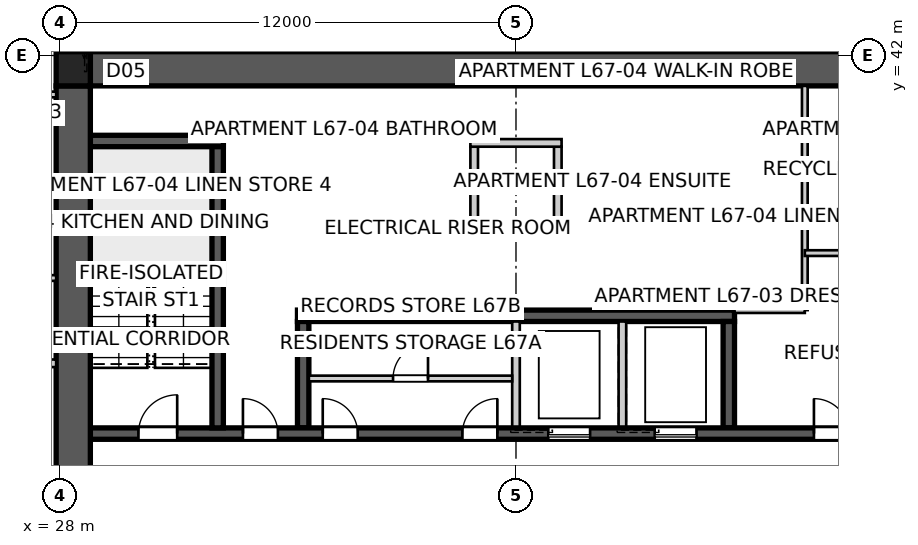
"""IFC4 building model, lengths in metres.
Left out: names, types, materials, properties, quantities, classifications, styles, units other than length and angle.
Written with IfcOpenShell. Run it as: python <this file> out.ifc"""

import sys

from ifc_helpers import new_model, si_unit, direction, frame, frame_2d, origin, origin_2d, place, context, subcontext, project, spatial, polyline, rectangle, outline, extrude, element, fill, save


model = new_model("IFC4")
c1 = context("Model", 3, precision=1e-05, world=origin(), true_north=direction((0.0, 1.0)))
c2 = subcontext(c1, "Body", "Model", "MODEL_VIEW")
j1 = project(units=[si_unit("LENGTHUNIT", "METRE"), si_unit("PLANEANGLEUNIT", "RADIAN")], contexts=[c1])
p1 = place(None, origin())
s1 = spatial("IfcSite", under=j1, at=p1, CompositionType="ELEMENT")
p2 = place(p1, origin())
s2 = spatial("IfcBuilding", under=s1, at=p2, CompositionType="ELEMENT")
p3 = place(p2, frame((0.0, 0.0, 243.8)))
s3 = spatial("IfcBuildingStorey", under=s2, at=p3, CompositionType="ELEMENT", Elevation=243.8)
p4 = place(p3, frame((28.8, 41.65, 0.0), z_axis=(0.0, 0.0, 1.0), x_axis=(1.0, 0.0, 0.0)))
e1 = element("IfcWall", 1, at=p4, inside=s3, PredefinedType="SHEAR", context=c2, shape_type="SweptSolid", body=[
    extrude(outline(polyline([(0.0, -0.45), (22.4, -0.45), (22.4, -0.025), (22.85, -0.025), (22.85, 0.025), (22.4, 0.025), (22.4, 0.45), (0.0, 0.45), (0.0, 0.025), (-0.45, 0.025), (-0.45, -0.025), (0.0, -0.025), (0.0, -0.45)])), origin(), (0.0, 0.0, 1.0), 3.4),
])
p5 = place(p3, frame((28.35, 41.2, 0.0), z_axis=(0.0, 0.0, 1.0), x_axis=(0.0, -1.0, 0.0)))
e2 = element("IfcWall", 2, at=p5, inside=s3, PredefinedType="SHEAR", context=c2, shape_type="SweptSolid", body=[
    extrude(outline(polyline([(0.0, -0.45), (22.4, -0.45), (22.4, -0.025), (22.85, -0.025), (22.85, 0.025), (22.4, 0.025), (22.4, 0.45), (0.0, 0.45), (0.0, 0.025), (-0.45, 0.025), (-0.45, -0.025), (0.0, -0.025), (0.0, -0.45)])), origin(), (0.0, 0.0, 1.0), 3.4),
])
p6 = place(p5, frame((11.14, 0.0, 0.0)))
e3 = element("IfcOpeningElement", 3, at=p6, cuts=e2, PredefinedType="OPENING", context=c2, shape_type="SweptSolid", body=[
    extrude(rectangle(XDim=1.02, YDim=2.4, at=frame_2d((0.51, 1.2))), frame((0.0, 0.46, 0.0), z_axis=(0.0, -1.0, 0.0), x_axis=(1.0, 0.0, 0.0)), (0.0, 0.0, 1.0), 0.92),
])
p7 = place(p3, frame((28.8, 32.05, 0.0), z_axis=(0.0, 0.0, 1.0), x_axis=(1.0, 0.0, 0.0)))
e4 = element("IfcWall", 4, at=p7, inside=s3, PredefinedType="SHEAR", context=c2, shape_type="SweptSolid", body=[
    extrude(rectangle(XDim=22.4, YDim=0.3, at=frame_2d((11.2, 0.0))), origin(), (0.0, 0.0, 1.0), 3.4),
])
p8 = place(p7, frame((19.04, 0.0, 0.0)))
e5 = element("IfcOpeningElement", 5, at=p8, cuts=e4, PredefinedType="OPENING", context=c2, shape_type="SweptSolid", body=[
    extrude(rectangle(XDim=0.92, YDim=2.1, at=frame_2d((0.46, 1.05))), frame((0.0, 0.16, 0.0), z_axis=(0.0, -1.0, 0.0), x_axis=(1.0, 0.0, 0.0)), (0.0, 0.0, 1.0), 0.32),
])
p9 = place(p7, frame((1.265, 0.0, 0.0)))
e6 = element("IfcOpeningElement", 6, at=p9, cuts=e4, PredefinedType="OPENING", context=c2, shape_type="SweptSolid", body=[
    extrude(rectangle(XDim=1.02, YDim=2.1, at=frame_2d((0.51, 1.05))), frame((0.0, 0.16, 0.0), z_axis=(0.0, -1.0, 0.0), x_axis=(1.0, 0.0, 0.0)), (0.0, 0.0, 1.0), 0.32),
])
p10 = place(p7, frame((4.015, 0.0, 0.0)))
e7 = element("IfcOpeningElement", 7, at=p10, cuts=e4, PredefinedType="OPENING", context=c2, shape_type="SweptSolid", body=[
    extrude(rectangle(XDim=0.92, YDim=2.1, at=frame_2d((0.46, 1.05))), frame((0.0, 0.16, 0.0), z_axis=(0.0, -1.0, 0.0), x_axis=(1.0, 0.0, 0.0)), (0.0, 0.0, 1.0), 0.32),
])
p11 = place(p7, frame((6.115, 0.0, 0.0)))
e8 = element("IfcOpeningElement", 8, at=p11, cuts=e4, PredefinedType="OPENING", context=c2, shape_type="SweptSolid", body=[
    extrude(rectangle(XDim=0.92, YDim=2.1, at=frame_2d((0.46, 1.05))), frame((0.0, 0.16, 0.0), z_axis=(0.0, -1.0, 0.0), x_axis=(1.0, 0.0, 0.0)), (0.0, 0.0, 1.0), 0.32),
])
p12 = place(p7, frame((9.79, 0.0, 0.0)))
e9 = element("IfcOpeningElement", 9, at=p12, cuts=e4, PredefinedType="OPENING", context=c2, shape_type="SweptSolid", body=[
    extrude(rectangle(XDim=0.92, YDim=2.1, at=frame_2d((0.46, 1.05))), frame((0.0, 0.16, 0.0), z_axis=(0.0, -1.0, 0.0), x_axis=(1.0, 0.0, 0.0)), (0.0, 0.0, 1.0), 0.32),
])
p13 = place(p7, frame((12.05, 0.0, 0.0)))
e10 = element("IfcOpeningElement", 10, at=p13, cuts=e4, PredefinedType="OPENING", context=c2, shape_type="SweptSolid", body=[
    extrude(rectangle(XDim=1.1, YDim=2.1, at=frame_2d((0.55, 1.05))), frame((0.0, 0.16, 0.0), z_axis=(0.0, -1.0, 0.0), x_axis=(1.0, 0.0, 0.0)), (0.0, 0.0, 1.0), 0.32),
])
p14 = place(p7, frame((14.85, 0.0, 0.0)))
e11 = element("IfcOpeningElement", 11, at=p14, cuts=e4, PredefinedType="OPENING", context=c2, shape_type="SweptSolid", body=[
    extrude(rectangle(XDim=1.1, YDim=2.1, at=frame_2d((0.55, 1.05))), frame((0.0, 0.16, 0.0), z_axis=(0.0, -1.0, 0.0), x_axis=(1.0, 0.0, 0.0)), (0.0, 0.0, 1.0), 0.32),
])
p15 = place(p3, frame((34.25, 35.15, 0.0), z_axis=(0.0, 0.0, 1.0), x_axis=(1.0, 0.0, 0.0)))
e12 = element("IfcWall", 12, at=p15, inside=s3, PredefinedType="SHEAR", context=c2, shape_type="SweptSolid", body=[
    extrude(rectangle(XDim=11.5, YDim=0.3, at=frame_2d((5.75, 0.0))), origin(), (0.0, 0.0, 1.0), 3.4),
])
p16 = place(p3, frame((34.4, 32.2, 0.0), z_axis=(0.0, 0.0, 1.0), x_axis=(0.0, 1.0, 0.0)))
e13 = element("IfcWall", 13, at=p16, inside=s3, PredefinedType="SHEAR", context=c2, shape_type="SweptSolid", body=[
    extrude(rectangle(XDim=2.8, YDim=0.3, at=frame_2d((1.4, 0.0))), origin(), (0.0, 0.0, 1.0), 3.4),
])
for number, where, z_axis, x_axis in (
    (14, (40.0, 32.2, 0.0), (0.0, 0.0, 1.0), (0.0, 1.0, 0.0)),
    (15, (42.8, 32.2, 0.0), (0.0, 0.0, 1.0), (0.0, 1.0, 0.0)),
):
    element("IfcWall", number, at=place(p3, frame(where, z_axis=z_axis, x_axis=x_axis)), inside=s3, PredefinedType="SOLIDWALL", context=c2, shape_type="SweptSolid", body=[
        extrude(rectangle(XDim=2.8, YDim=0.2, at=frame_2d((1.4, 0.0))), origin(), (0.0, 0.0, 1.0), 3.4),
    ])
p17 = place(p3, frame((45.6, 32.2, 0.0), z_axis=(0.0, 0.0, 1.0), x_axis=(0.0, 1.0, 0.0)))
e16 = element("IfcWall", 16, at=p17, inside=s3, PredefinedType="SHEAR", context=c2, shape_type="SweptSolid", body=[
    extrude(rectangle(XDim=2.8, YDim=0.3, at=frame_2d((1.4, 0.0))), origin(), (0.0, 0.0, 1.0), 3.4),
])
p18 = place(p3, frame((32.15, 32.2, 0.0), z_axis=(0.0, 0.0, 1.0), x_axis=(0.0, 1.0, 0.0)))
e17 = element("IfcWall", 17, at=p18, inside=s3, PredefinedType="SHEAR", context=c2, shape_type="SweptSolid", body=[
    extrude(rectangle(XDim=7.7, YDim=0.3, at=frame_2d((3.85, 0.0))), origin(), (0.0, 0.0, 1.0), 3.4),
])
p19 = place(p3, frame((28.8, 39.75, 0.0), z_axis=(0.0, 0.0, 1.0), x_axis=(1.0, 0.0, 0.0)))
e18 = element("IfcWall", 18, at=p19, inside=s3, PredefinedType="SHEAR", context=c2, shape_type="SweptSolid", body=[
    extrude(rectangle(XDim=3.5, YDim=0.3, at=frame_2d((1.75, 0.0))), origin(), (0.0, 0.0, 1.0), 3.4),
])
for number, where, z_axis, x_axis in (
    (19, (38.9, 37.6, 0.0), (0.0, 0.0, 1.0), (0.0, 1.0, 0.0)),
    (20, (41.1, 37.6, 0.0), (0.0, 0.0, 1.0), (0.0, 1.0, 0.0)),
):
    element("IfcWall", number, at=place(p3, frame(where, z_axis=z_axis, x_axis=x_axis)), inside=s3, PredefinedType="SOLIDWALL", context=c2, shape_type="SweptSolid", body=[
        extrude(rectangle(XDim=2.0, YDim=0.2, at=frame_2d((1.0, 0.0))), origin(), (0.0, 0.0, 1.0), 3.4),
    ])
for number, where, z_axis, x_axis in (
    (21, (38.8, 37.5, 0.0), (0.0, 0.0, 1.0), (1.0, 0.0, 0.0)),
    (22, (38.8, 39.7, 0.0), (0.0, 0.0, 1.0), (1.0, 0.0, 0.0)),
):
    element("IfcWall", number, at=place(p3, frame(where, z_axis=z_axis, x_axis=x_axis)), inside=s3, PredefinedType="SOLIDWALL", context=c2, shape_type="SweptSolid", body=[
        extrude(rectangle(XDim=2.4, YDim=0.2, at=frame_2d((1.2, 0.0))), origin(), (0.0, 0.0, 1.0), 3.4),
    ])
p20 = place(p3, frame((28.35, 41.65, 0.0), z_axis=(0.0, 0.0, 1.0), x_axis=(1.0, 0.0, 0.0)))
e23 = element("IfcColumn", 23, at=p20, inside=s3, PredefinedType="COLUMN", context=c2, shape_type="SweptSolid", body=[
    extrude(rectangle(XDim=0.9, YDim=0.9, at=origin_2d()), origin(), (0.0, 0.0, 1.0), 3.4),
])
p21 = place(p3, frame((27.9, 33.9, 0.0), z_axis=(0.0, 0.0, 1.0), x_axis=(-1.0, 0.0, 0.0)))
e24 = element("IfcWall", 24, at=p21, inside=s3, PredefinedType="PARTITIONING", context=c2, shape_type="SweptSolid", body=[
    extrude(rectangle(XDim=2.5, YDim=0.2, at=frame_2d((1.25, 0.0))), origin(), (0.0, 0.0, 1.0), 3.25),
])
p22 = place(p3, frame((47.6, 41.2, 0.0), z_axis=(0.0, 0.0, 1.0), x_axis=(0.0, -1.0, 0.0)))
e25 = element("IfcWall", 25, at=p22, inside=s3, PredefinedType="SOLIDWALL", context=c2, shape_type="SweptSolid", body=[
    extrude(rectangle(XDim=5.9, YDim=0.15, at=frame_2d((2.95, 0.0))), origin(), (0.0, 0.0, 1.0), 3.25),
])
p23 = place(p3, frame((47.6, 35.3, 0.0), z_axis=(0.0, 0.0, 1.0), x_axis=(-1.0, 0.0, 0.0)))
e26 = element("IfcWall", 26, at=p23, inside=s3, PredefinedType="SOLIDWALL", context=c2, shape_type="SweptSolid", body=[
    extrude(rectangle(XDim=1.85, YDim=0.15, at=frame_2d((0.925, 0.0))), origin(), (0.0, 0.0, 1.0), 3.25),
])
p24 = place(p3, frame((47.6, 36.8, 0.0), z_axis=(0.0, 0.0, 1.0), x_axis=(1.0, 0.0, 0.0)))
e27 = element("IfcWall", 27, at=p24, inside=s3, PredefinedType="SOLIDWALL", context=c2, shape_type="SweptSolid", body=[
    extrude(rectangle(XDim=3.6, YDim=0.15, at=frame_2d((1.8, 0.0))), origin(), (0.0, 0.0, 1.0), 3.25),
])
p25 = place(p24, frame((1.34, 0.0, 0.0)))
e28 = element("IfcOpeningElement", 28, at=p25, cuts=e27, PredefinedType="OPENING", context=c2, shape_type="SweptSolid", body=[
    extrude(rectangle(XDim=0.92, YDim=2.1, at=frame_2d((0.46, 1.05))), frame((0.0, 0.085, 0.0), z_axis=(0.0, -1.0, 0.0), x_axis=(1.0, 0.0, 0.0)), (0.0, 0.0, 1.0), 0.17),
])
p26 = place(p3, frame((23.0, 36.145, 0.0), z_axis=(0.0, 0.0, 1.0), x_axis=(1.0, 0.0, 0.0)))
e29 = element("IfcWall", 29, at=p26, inside=s3, PredefinedType="SOLIDWALL", context=c2, shape_type="SweptSolid", body=[
    extrude(rectangle(XDim=4.9, YDim=0.15, at=frame_2d((2.45, 0.0))), origin(), (0.0, 0.0, 1.0), 3.25),
])
p27 = place(p26, frame((1.99, 0.0, 0.0)))
e30 = element("IfcOpeningElement", 30, at=p27, cuts=e29, PredefinedType="OPENING", context=c2, shape_type="SweptSolid", body=[
    extrude(rectangle(XDim=0.92, YDim=2.34, at=frame_2d((0.46, 1.17))), frame((0.0, 0.085, 0.0), z_axis=(0.0, -1.0, 0.0), x_axis=(1.0, 0.0, 0.0)), (0.0, 0.0, 1.0), 0.17),
])
p28 = place(p3, frame((28.708, 41.18, 0.0), z_axis=(0.0, 0.0, 1.0), x_axis=(0.0, 1.0, 0.0)))
e31 = element("IfcWall", 31, at=p28, inside=s3, PredefinedType="PARTITIONING", context=c2, shape_type="SweptSolid", body=[
    extrude(rectangle(XDim=2.458, YDim=0.12, at=frame_2d((1.229, 0.0))), origin(), (0.0, 0.0, 1.0), 3.25),
])
p29 = place(p28, frame((1.259, 0.0, 0.0)))
e32 = element("IfcOpeningElement", 32, at=p29, cuts=e31, PredefinedType="OPENING", context=c2, shape_type="SweptSolid", body=[
    extrude(rectangle(XDim=0.96, YDim=2.1, at=frame_2d((0.48, 1.05))), frame((0.0, 0.07, 0.0), z_axis=(0.0, -1.0, 0.0), x_axis=(1.0, 0.0, 0.0)), (0.0, 0.0, 1.0), 0.14),
])
p30 = place(p3, frame((27.9, 40.974, 0.0), z_axis=(0.0, 0.0, 1.0), x_axis=(-1.0, 0.0, 0.0)))
e33 = element("IfcWall", 33, at=p30, inside=s3, PredefinedType="SOLIDWALL", context=c2, shape_type="SweptSolid", body=[
    extrude(rectangle(XDim=4.9, YDim=0.15, at=frame_2d((2.45, 0.0))), origin(), (0.0, 0.0, 1.0), 3.25),
])
p31 = place(p30, frame((1.97, 0.0, 0.0)))
e34 = element("IfcOpeningElement", 34, at=p31, cuts=e33, PredefinedType="OPENING", context=c2, shape_type="SweptSolid", body=[
    extrude(rectangle(XDim=0.96, YDim=2.1, at=frame_2d((0.48, 1.05))), frame((0.0, 0.085, 0.0), z_axis=(0.0, -1.0, 0.0), x_axis=(1.0, 0.0, 0.0)), (0.0, 0.0, 1.0), 0.17),
])
p32 = place(p3, frame((34.55, 33.5, 0.0), z_axis=(0.0, 0.0, 1.0), x_axis=(1.0, 0.0, 0.0)))
e35 = element("IfcWall", 35, at=p32, inside=s3, PredefinedType="SOLIDWALL", context=c2, shape_type="SweptSolid", body=[
    extrude(rectangle(XDim=5.35, YDim=0.15, at=frame_2d((2.675, 0.0))), origin(), (0.0, 0.0, 1.0), 3.25),
])
p33 = place(p32, frame((2.215, 0.0, 0.0)))
e36 = element("IfcOpeningElement", 36, at=p33, cuts=e35, PredefinedType="OPENING", context=c2, shape_type="SweptSolid", body=[
    extrude(rectangle(XDim=0.92, YDim=2.1, at=frame_2d((0.46, 1.05))), frame((0.0, 0.085, 0.0), z_axis=(0.0, -1.0, 0.0), x_axis=(1.0, 0.0, 0.0)), (0.0, 0.0, 1.0), 0.17),
])
p34 = place(p8, origin())
e37 = element("IfcDoor", 37, at=p34, inside=s3, OperationType="SINGLE_SWING_LEFT", PredefinedType="DOOR", context=c2, shape_type="SweptSolid", body=[
    extrude(rectangle(XDim=0.92, YDim=2.1, at=frame_2d((0.46, 1.05))), frame((0.0, 0.025, 0.0), z_axis=(0.0, -1.0, 0.0), x_axis=(1.0, 0.0, 0.0)), (0.0, 0.0, 1.0), 0.05),
])
fill(e5, e37)
p35 = place(p9, origin())
e38 = element("IfcDoor", 38, at=p35, inside=s3, OperationType="SINGLE_SWING_RIGHT", PredefinedType="DOOR", context=c2, shape_type="SweptSolid", body=[
    extrude(rectangle(XDim=1.02, YDim=2.1, at=frame_2d((0.51, 1.05))), frame((0.0, 0.025, 0.0), z_axis=(0.0, -1.0, 0.0), x_axis=(1.0, 0.0, 0.0)), (0.0, 0.0, 1.0), 0.05),
])
fill(e6, e38)
p36 = place(p10, origin())
e39 = element("IfcDoor", 39, at=p36, inside=s3, OperationType="SINGLE_SWING_LEFT", PredefinedType="DOOR", context=c2, shape_type="SweptSolid", body=[
    extrude(rectangle(XDim=0.92, YDim=2.1, at=frame_2d((0.46, 1.05))), frame((0.0, 0.025, 0.0), z_axis=(0.0, -1.0, 0.0), x_axis=(1.0, 0.0, 0.0)), (0.0, 0.0, 1.0), 0.05),
])
fill(e7, e39)
p37 = place(p11, origin())
e40 = element("IfcDoor", 40, at=p37, inside=s3, OperationType="SINGLE_SWING_LEFT", PredefinedType="DOOR", context=c2, shape_type="SweptSolid", body=[
    extrude(rectangle(XDim=0.92, YDim=2.1, at=frame_2d((0.46, 1.05))), frame((0.0, 0.025, 0.0), z_axis=(0.0, -1.0, 0.0), x_axis=(1.0, 0.0, 0.0)), (0.0, 0.0, 1.0), 0.05),
])
fill(e8, e40)
p38 = place(p12, origin())
e41 = element("IfcDoor", 41, at=p38, inside=s3, OperationType="SINGLE_SWING_RIGHT", PredefinedType="DOOR", context=c2, shape_type="SweptSolid", body=[
    extrude(rectangle(XDim=0.92, YDim=2.1, at=frame_2d((0.46, 1.05))), frame((0.0, 0.025, 0.0), z_axis=(0.0, -1.0, 0.0), x_axis=(1.0, 0.0, 0.0)), (0.0, 0.0, 1.0), 0.05),
])
fill(e9, e41)
p39 = place(p33, origin())
e42 = element("IfcDoor", 42, at=p39, inside=s3, OperationType="SINGLE_SWING_RIGHT", PredefinedType="DOOR", context=c2, shape_type="SweptSolid", body=[
    extrude(rectangle(XDim=0.92, YDim=2.1, at=frame_2d((0.46, 1.05))), frame((0.0, 0.025, 0.0), z_axis=(0.0, -1.0, 0.0), x_axis=(1.0, 0.0, 0.0)), (0.0, 0.0, 1.0), 0.05),
])
fill(e36, e42)
p40 = place(p13, origin())
e43 = element("IfcDoor", 43, at=p40, inside=s3, OperationType="SLIDING_TO_LEFT", PredefinedType="DOOR", context=c2, shape_type="SweptSolid", body=[
    extrude(rectangle(XDim=1.1, YDim=2.1, at=frame_2d((0.55, 1.05))), frame((0.0, 0.025, 0.0), z_axis=(0.0, -1.0, 0.0), x_axis=(1.0, 0.0, 0.0)), (0.0, 0.0, 1.0), 0.05),
])
fill(e10, e43)
p41 = place(p14, origin())
e44 = element("IfcDoor", 44, at=p41, inside=s3, OperationType="SLIDING_TO_LEFT", PredefinedType="DOOR", context=c2, shape_type="SweptSolid", body=[
    extrude(rectangle(XDim=1.1, YDim=2.1, at=frame_2d((0.55, 1.05))), frame((0.0, 0.025, 0.0), z_axis=(0.0, -1.0, 0.0), x_axis=(1.0, 0.0, 0.0)), (0.0, 0.0, 1.0), 0.05),
])
fill(e11, e44)
save(model, sys.argv[1])
